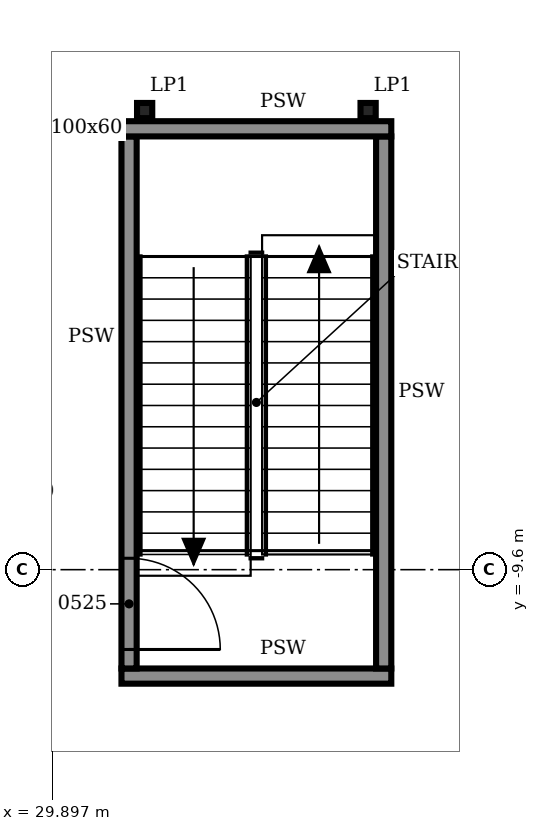
"""IFC4 building model, lengths in metres.
Left out: names, types, materials, properties, quantities, classifications, styles, units other than length and angle.
Written with IfcOpenShell. Run it as: python <this file> out.ifc"""

import sys

from ifc_helpers import new_model, si_unit, direction, frame, frame_2d, origin, origin_2d, place, context, subcontext, project, spatial, rectangle, i_section, extrude, element, fill, save


model = new_model("IFC4")
c1 = context("Model", 3, precision=1e-05, world=origin(), true_north=direction((0.0, 1.0)))
c2 = subcontext(c1, "Body", "Model", "MODEL_VIEW")
j1 = project(units=[si_unit("LENGTHUNIT", "METRE"), si_unit("PLANEANGLEUNIT", "RADIAN")], contexts=[c1])
p1 = place(None, origin())
s1 = spatial("IfcSite", under=j1, at=p1, CompositionType="ELEMENT")
p2 = place(p1, origin())
s2 = spatial("IfcBuilding", under=s1, at=p2, CompositionType="ELEMENT")
p3 = place(p2, frame((0.0, 0.0, 30.6)))
s3 = spatial("IfcBuildingStorey", under=s2, at=p3, CompositionType="ELEMENT", Elevation=30.6)
for number, where, z_axis, x_axis in (
    (1, (31.105, -3.56, 0.0), (0.0, 0.0, 1.0), (1.0, 0.0, 0.0)),
    (2, (34.045, -3.56, 0.0), (0.0, 0.0, 1.0), (1.0, 0.0, 0.0)),
):
    element("IfcColumn", number, at=place(p3, frame(where, z_axis=z_axis, x_axis=x_axis)), inside=s3, PredefinedType="COLUMN", context=c2, shape_type="SweptSolid", body=[
        extrude(i_section(OverallWidth=0.2, OverallDepth=0.2, WebThickness=0.009, FlangeThickness=0.015, FilletRadius=0.018, at=origin_2d()), origin(), (0.0, 0.0, 1.0), 4.8),
    ])
p4 = place(p3, frame((30.8, -11.0, 0.0), z_axis=(0.0, 0.0, 1.0), x_axis=(1.0, 0.0, 0.0)))
e3 = element("IfcWall", 3, at=p4, inside=s3, PredefinedType="SOLIDWALL", context=c2, shape_type="SweptSolid", body=[
    extrude(rectangle(XDim=3.55, YDim=0.2, at=frame_2d((1.775, 0.0))), origin(), (0.0, 0.0, 1.0), 4.6),
])
p5 = place(p3, frame((30.9, -10.9, 0.0), z_axis=(0.0, 0.0, 1.0), x_axis=(0.0, 1.0, 0.0)))
e4 = element("IfcWall", 4, at=p5, inside=s3, PredefinedType="SOLIDWALL", context=c2, shape_type="SweptSolid", body=[
    extrude(rectangle(XDim=7.0, YDim=0.2, at=frame_2d((3.5, 0.0))), origin(), (0.0, 0.0, 1.0), 4.6),
])
p6 = place(p5, frame((0.25, 0.0, 0.0)))
e5 = element("IfcOpeningElement", 5, at=p6, cuts=e4, PredefinedType="OPENING", context=c2, shape_type="SweptSolid", body=[
    extrude(rectangle(XDim=1.2, YDim=2.1, at=frame_2d((0.6, 1.05))), frame((0.0, 0.11, 0.0), z_axis=(0.0, -1.0, 0.0), x_axis=(1.0, 0.0, 0.0)), (0.0, 0.0, 1.0), 0.22),
])
p7 = place(p3, frame((34.25, -10.9, 0.0), z_axis=(0.0, 0.0, 1.0), x_axis=(0.0, 1.0, 0.0)))
e6 = element("IfcWall", 6, at=p7, inside=s3, PredefinedType="SOLIDWALL", context=c2, shape_type="SweptSolid", body=[
    extrude(rectangle(XDim=7.0, YDim=0.2, at=frame_2d((3.5, 0.0))), origin(), (0.0, 0.0, 1.0), 4.6),
])
p8 = place(p3, frame((30.8, -3.8, 0.0), z_axis=(0.0, 0.0, 1.0), x_axis=(1.0, 0.0, 0.0)))
e7 = element("IfcWall", 7, at=p8, inside=s3, PredefinedType="SOLIDWALL", context=c2, shape_type="SweptSolid", body=[
    extrude(rectangle(XDim=3.55, YDim=0.2, at=frame_2d((1.775, 0.0))), origin(), (0.0, 0.0, 1.0), 4.6),
])
p9 = place(p6, frame((1.2, 0.0, 0.0), z_axis=(0.0, 0.0, 1.0), x_axis=(-1.0, 0.0, 0.0)))
e8 = element("IfcDoor", 8, at=p9, inside=s3, OperationType="SINGLE_SWING_RIGHT", PredefinedType="DOOR", context=c2, shape_type="SweptSolid", body=[
    extrude(rectangle(XDim=1.2, YDim=2.1, at=frame_2d((0.6, 1.05))), frame((0.0, 0.025, 0.0), z_axis=(0.0, -1.0, 0.0), x_axis=(1.0, 0.0, 0.0)), (0.0, 0.0, 1.0), 0.05),
])
fill(e5, e8)
save(model, sys.argv[1])
